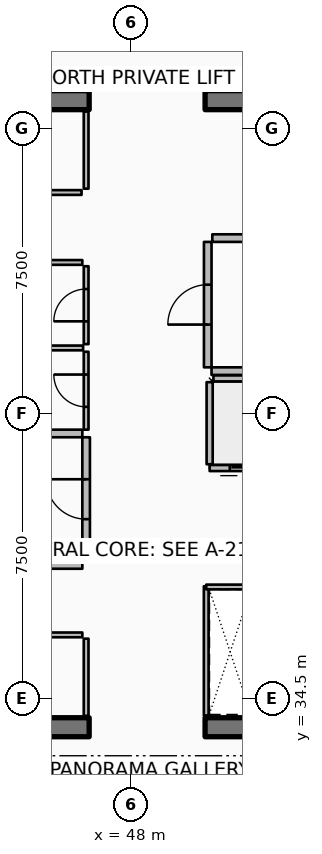
"""IFC4 building model, lengths in metres.
Left out: names, types, materials, properties, quantities, classifications, styles, units other than length and angle.
Written with IfcOpenShell. Run it as: python <this file> out.ifc"""

import sys

from ifc_helpers import new_model, si_unit, direction, frame, frame_2d, origin, place, context, subcontext, project, spatial, rectangle, extrude, element, fill, save


model = new_model("IFC4")
c1 = context("Model", 3, precision=1e-05, world=origin(), true_north=direction((0.0, 1.0)))
c2 = subcontext(c1, "Body", "Model", "MODEL_VIEW")
j1 = project(units=[si_unit("LENGTHUNIT", "METRE"), si_unit("PLANEANGLEUNIT", "RADIAN")], contexts=[c1])
p1 = place(None, origin())
s1 = spatial("IfcSite", under=j1, at=p1, CompositionType="ELEMENT")
p2 = place(p1, origin())
s2 = spatial("IfcBuilding", under=s1, at=p2, CompositionType="ELEMENT")
p3 = place(p2, frame((0.0, 0.0, 306.0)))
s3 = spatial("IfcBuildingStorey", under=s2, at=p3, CompositionType="ELEMENT", Elevation=306.0)
p4 = place(p3, frame((37.3, 33.75, 0.0), z_axis=(0.0, 0.0, 1.0), x_axis=(1.0, 0.0, 0.0)))
e1 = element("IfcWall", 1, at=p4, inside=s3, PredefinedType="SHEAR", context=c2, shape_type="SweptSolid", body=[
    extrude(rectangle(XDim=9.6, YDim=0.5, at=frame_2d((4.8, 0.0))), origin(), (0.0, 0.0, 1.0), 3.85),
])
p5 = place(p3, frame((49.95, 33.75, 0.0), z_axis=(0.0, 0.0, 1.0), x_axis=(1.0, 0.0, 0.0)))
e2 = element("IfcWall", 2, at=p5, inside=s3, PredefinedType="SHEAR", context=c2, shape_type="SweptSolid", body=[
    extrude(rectangle(XDim=9.6, YDim=0.5, at=frame_2d((4.8, 0.0))), origin(), (0.0, 0.0, 1.0), 3.85),
])
p6 = place(p3, frame((37.3, 50.25, 0.0), z_axis=(0.0, 0.0, 1.0), x_axis=(1.0, 0.0, 0.0)))
e3 = element("IfcWall", 3, at=p6, inside=s3, PredefinedType="SHEAR", context=c2, shape_type="SweptSolid", body=[
    extrude(rectangle(XDim=9.6, YDim=0.5, at=frame_2d((4.8, 0.0))), origin(), (0.0, 0.0, 1.0), 3.85),
])
p7 = place(p3, frame((49.95, 50.25, 0.0), z_axis=(0.0, 0.0, 1.0), x_axis=(1.0, 0.0, 0.0)))
e4 = element("IfcWall", 4, at=p7, inside=s3, PredefinedType="SHEAR", context=c2, shape_type="SweptSolid", body=[
    extrude(rectangle(XDim=9.6, YDim=0.5, at=frame_2d((4.8, 0.0))), origin(), (0.0, 0.0, 1.0), 3.85),
])
p8 = place(p3, frame((52.23, 40.57, 0.0), z_axis=(0.0, 0.0, 1.0), x_axis=(-1.0, 0.0, 0.0)))
e5 = element("IfcWall", 5, at=p8, inside=s3, PredefinedType="PARTITIONING", context=c2, shape_type="SweptSolid", body=[
    extrude(rectangle(XDim=2.16, YDim=0.16, at=frame_2d((1.08, 0.0))), origin(), (0.0, 0.0, 1.0), 3.45),
])
p9 = place(p8, frame((0.53, 0.0, 0.0)))
e6 = element("IfcOpeningElement", 6, at=p9, cuts=e5, PredefinedType="OPENING", context=c2, shape_type="SweptSolid", body=[
    extrude(rectangle(XDim=1.1, YDim=2.1, at=frame_2d((0.55, 1.05))), frame((0.0, 0.09, 0.0), z_axis=(0.0, -1.0, 0.0), x_axis=(1.0, 0.0, 0.0)), (0.0, 0.0, 1.0), 0.18),
])
p10 = place(p3, frame((50.07, 40.67, 0.0), z_axis=(0.0, 0.0, 1.0), x_axis=(0.0, 1.0, 0.0)))
e7 = element("IfcWall", 7, at=p10, inside=s3, PredefinedType="PARTITIONING", context=c2, shape_type="SweptSolid", body=[
    extrude(rectangle(XDim=2.16, YDim=0.16, at=frame_2d((1.08, 0.0))), origin(), (0.0, 0.0, 1.0), 3.45),
])
p11 = place(p3, frame((50.17, 42.93, 0.0), z_axis=(0.0, 0.0, 1.0), x_axis=(1.0, 0.0, 0.0)))
e8 = element("IfcWall", 8, at=p11, inside=s3, PredefinedType="PARTITIONING", context=c2, shape_type="SweptSolid", body=[
    extrude(rectangle(XDim=1.96, YDim=0.16, at=frame_2d((0.98, 0.0))), origin(), (0.0, 0.0, 1.0), 3.45),
])
p12 = place(p3, frame((46.82, 34.05, 0.0), z_axis=(0.0, 0.0, 1.0), x_axis=(0.0, 1.0, 0.0)))
e9 = element("IfcWall", 9, at=p12, inside=s3, PredefinedType="PARTITIONING", context=c2, shape_type="SweptSolid", body=[
    extrude(rectangle(XDim=2.03, YDim=0.125, at=frame_2d((1.015, 0.0))), origin(), (0.0, 0.0, 1.0), 2.89),
])
p13 = place(p3, frame((42.6, 36.18, 0.0), z_axis=(0.0, 0.0, 1.0), x_axis=(1.0, 0.0, 0.0)))
e10 = element("IfcWall", 10, at=p13, inside=s3, PredefinedType="PARTITIONING", context=c2, shape_type="SweptSolid", body=[
    extrude(rectangle(XDim=4.12, YDim=0.125, at=frame_2d((2.06, 0.0))), origin(), (0.0, 0.0, 1.0), 2.89),
])
p14 = place(p13, frame((1.635, 0.0, 0.0)))
e11 = element("IfcOpeningElement", 11, at=p14, cuts=e10, PredefinedType="OPENING", context=c2, shape_type="SweptSolid", body=[
    extrude(rectangle(XDim=0.85, YDim=2.06, at=frame_2d((0.425, 1.03))), frame((0.0, 0.073, 0.0), z_axis=(0.0, -1.0, 0.0), x_axis=(1.0, 0.0, 0.0)), (0.0, 0.0, 1.0), 0.145),
])
p15 = place(p3, frame((46.82, 47.92, 0.0), z_axis=(0.0, 0.0, 1.0), x_axis=(0.0, 1.0, 0.0)))
e12 = element("IfcWall", 12, at=p15, inside=s3, PredefinedType="PARTITIONING", context=c2, shape_type="SweptSolid", body=[
    extrude(rectangle(XDim=2.03, YDim=0.125, at=frame_2d((1.015, 0.0))), origin(), (0.0, 0.0, 1.0), 2.89),
])
p16 = place(p3, frame((37.92, 47.82, 0.0), z_axis=(0.0, 0.0, 1.0), x_axis=(1.0, 0.0, 0.0)))
e13 = element("IfcWall", 13, at=p16, inside=s3, PredefinedType="PARTITIONING", context=c2, shape_type="SweptSolid", body=[
    extrude(rectangle(XDim=8.78, YDim=0.125, at=frame_2d((4.39, 0.0))), origin(), (0.0, 0.0, 1.0), 2.89),
])
p17 = place(p16, frame((3.965, 0.0, 0.0)))
e14 = element("IfcOpeningElement", 14, at=p17, cuts=e13, PredefinedType="OPENING", context=c2, shape_type="SweptSolid", body=[
    extrude(rectangle(XDim=0.85, YDim=2.06, at=frame_2d((0.425, 1.03))), frame((0.0, 0.073, 0.0), z_axis=(0.0, -1.0, 0.0), x_axis=(1.0, 0.0, 0.0)), (0.0, 0.0, 1.0), 0.145),
])
p18 = place(p3, frame((41.35, 38.02, 0.0), z_axis=(0.0, 0.0, 1.0), x_axis=(1.0, 0.0, 0.0)))
e15 = element("IfcWall", 15, at=p18, inside=s3, PredefinedType="PARTITIONING", context=c2, shape_type="SweptSolid", body=[
    extrude(rectangle(XDim=5.37, YDim=0.2, at=frame_2d((2.685, 0.0))), origin(), (0.0, 0.0, 1.0), 3.45),
])
p19 = place(p3, frame((43.92, 41.48, 0.0), z_axis=(0.0, 0.0, 1.0), x_axis=(1.0, 0.0, 0.0)))
e16 = element("IfcWall", 16, at=p19, inside=s3, PredefinedType="PARTITIONING", context=c2, shape_type="SweptSolid", body=[
    extrude(rectangle(XDim=2.8, YDim=0.2, at=frame_2d((1.4, 0.0))), origin(), (0.0, 0.0, 1.0), 3.45),
])
p20 = place(p3, frame((46.82, 38.12, 0.0), z_axis=(0.0, 0.0, 1.0), x_axis=(0.0, 1.0, 0.0)))
e17 = element("IfcWall", 17, at=p20, inside=s3, PredefinedType="PARTITIONING", context=c2, shape_type="SweptSolid", body=[
    extrude(rectangle(XDim=3.26, YDim=0.2, at=frame_2d((1.63, 0.0))), origin(), (0.0, 0.0, 1.0), 3.45),
])
p21 = place(p20, frame((1.105, 0.0, 0.0)))
e18 = element("IfcOpeningElement", 18, at=p21, cuts=e17, PredefinedType="OPENING", context=c2, shape_type="SweptSolid", body=[
    extrude(rectangle(XDim=1.05, YDim=2.1, at=frame_2d((0.525, 1.05))), frame((0.0, 0.11, 0.0), z_axis=(0.0, -1.0, 0.0), x_axis=(1.0, 0.0, 0.0)), (0.0, 0.0, 1.0), 0.22),
])
p22 = place(p3, frame((50.12, 43.12, 0.0), z_axis=(0.0, 0.0, 1.0), x_axis=(1.0, 0.0, 0.0)))
e19 = element("IfcWall", 19, at=p22, inside=s3, PredefinedType="PARTITIONING", context=c2, shape_type="SweptSolid", body=[
    extrude(rectangle(XDim=8.88, YDim=0.2, at=frame_2d((4.44, 0.0))), origin(), (0.0, 0.0, 1.0), 3.45),
])
p23 = place(p3, frame((50.14, 46.62, 0.0), z_axis=(0.0, 0.0, 1.0), x_axis=(1.0, 0.0, 0.0)))
e20 = element("IfcWall", 20, at=p23, inside=s3, PredefinedType="PARTITIONING", context=c2, shape_type="SweptSolid", body=[
    extrude(rectangle(XDim=1.02, YDim=0.2, at=frame_2d((0.51, 0.0))), origin(), (0.0, 0.0, 1.0), 3.45),
])
p24 = place(p3, frame((50.02, 43.22, 0.0), z_axis=(0.0, 0.0, 1.0), x_axis=(0.0, 1.0, 0.0)))
e21 = element("IfcWall", 21, at=p24, inside=s3, PredefinedType="PARTITIONING", context=c2, shape_type="SweptSolid", body=[
    extrude(rectangle(XDim=3.3, YDim=0.2, at=frame_2d((1.65, 0.0))), origin(), (0.0, 0.0, 1.0), 3.45),
])
p25 = place(p24, frame((1.125, 0.0, 0.0)))
e22 = element("IfcOpeningElement", 22, at=p25, cuts=e21, PredefinedType="OPENING", context=c2, shape_type="SweptSolid", body=[
    extrude(rectangle(XDim=1.05, YDim=2.1, at=frame_2d((0.525, 1.05))), frame((0.0, 0.11, 0.0), z_axis=(0.0, -1.0, 0.0), x_axis=(1.0, 0.0, 0.0)), (0.0, 0.0, 1.0), 0.22),
])
p26 = place(p3, frame((41.36, 45.98, 0.0), z_axis=(0.0, 0.0, 1.0), x_axis=(1.0, 0.0, 0.0)))
e23 = element("IfcWall", 23, at=p26, inside=s3, PredefinedType="PARTITIONING", context=c2, shape_type="SweptSolid", body=[
    extrude(rectangle(XDim=5.36, YDim=0.125, at=frame_2d((2.68, 0.0))), origin(), (0.0, 0.0, 1.0), 2.89),
])
p27 = place(p3, frame((49.98, 34.06, 0.0), z_axis=(0.0, 0.0, 1.0), x_axis=(0.0, 1.0, 0.0)))
e24 = element("IfcWall", 24, at=p27, inside=s3, PredefinedType="PARTITIONING", context=c2, shape_type="SweptSolid", body=[
    extrude(rectangle(XDim=3.4, YDim=0.125, at=frame_2d((1.7, 0.0))), origin(), (0.0, 0.0, 1.0), 2.89),
])
p28 = place(p3, frame((49.98, 37.44, 0.0), z_axis=(0.0, 0.0, 1.0), x_axis=(1.0, 0.0, 0.0)))
e25 = element("IfcWall", 25, at=p28, inside=s3, PredefinedType="PARTITIONING", context=c2, shape_type="SweptSolid", body=[
    extrude(rectangle(XDim=1.26, YDim=0.125, at=frame_2d((0.63, 0.0))), origin(), (0.0, 0.0, 1.0), 2.89),
])
p29 = place(p3, frame((44.03, 43.73, 0.0), z_axis=(0.0, 0.0, 1.0), x_axis=(1.0, 0.0, 0.0)))
e26 = element("IfcWall", 26, at=p29, inside=s3, PredefinedType="PARTITIONING", context=c2, shape_type="SweptSolid", body=[
    extrude(rectangle(XDim=2.71, YDim=0.125, at=frame_2d((1.355, 0.0))), origin(), (0.0, 0.0, 1.0), 2.89),
])
p30 = place(p3, frame((46.82, 41.58, 0.0), z_axis=(0.0, 0.0, 1.0), x_axis=(0.0, 1.0, 0.0)))
e27 = element("IfcWall", 27, at=p30, inside=s3, PredefinedType="PARTITIONING", context=c2, shape_type="SweptSolid", body=[
    extrude(rectangle(XDim=2.05, YDim=0.125, at=frame_2d((1.025, 0.0))), origin(), (0.0, 0.0, 1.0), 2.89),
])
p31 = place(p30, frame((0.6, 0.0, 0.0)))
e28 = element("IfcOpeningElement", 28, at=p31, cuts=e27, PredefinedType="OPENING", context=c2, shape_type="SweptSolid", body=[
    extrude(rectangle(XDim=0.85, YDim=2.06, at=frame_2d((0.425, 1.03))), frame((0.0, 0.073, 0.0), z_axis=(0.0, -1.0, 0.0), x_axis=(1.0, 0.0, 0.0)), (0.0, 0.0, 1.0), 0.145),
])
p32 = place(p3, frame((46.82, 43.83, 0.0), z_axis=(0.0, 0.0, 1.0), x_axis=(0.0, 1.0, 0.0)))
e29 = element("IfcWall", 29, at=p32, inside=s3, PredefinedType="PARTITIONING", context=c2, shape_type="SweptSolid", body=[
    extrude(rectangle(XDim=2.05, YDim=0.125, at=frame_2d((1.025, 0.0))), origin(), (0.0, 0.0, 1.0), 2.89),
])
p33 = place(p32, frame((0.6, 0.0, 0.0)))
e30 = element("IfcOpeningElement", 30, at=p33, cuts=e29, PredefinedType="OPENING", context=c2, shape_type="SweptSolid", body=[
    extrude(rectangle(XDim=0.85, YDim=2.06, at=frame_2d((0.425, 1.03))), frame((0.0, 0.073, 0.0), z_axis=(0.0, -1.0, 0.0), x_axis=(1.0, 0.0, 0.0)), (0.0, 0.0, 1.0), 0.145),
])
p34 = place(p9, origin())
e31 = element("IfcDoor", 31, at=p34, inside=s3, OperationType="DOUBLE_DOOR_SLIDING", PredefinedType="DOOR", context=c2, shape_type="SweptSolid", body=[
    extrude(rectangle(XDim=1.1, YDim=2.1, at=frame_2d((0.55, 1.05))), frame((0.0, 0.025, 0.0), z_axis=(0.0, -1.0, 0.0), x_axis=(1.0, 0.0, 0.0)), (0.0, 0.0, 1.0), 0.05),
])
fill(e6, e31)
p35 = place(p21, origin())
e32 = element("IfcDoor", 32, at=p35, inside=s3, OperationType="SINGLE_SWING_RIGHT", PredefinedType="DOOR", context=c2, shape_type="SweptSolid", body=[
    extrude(rectangle(XDim=1.05, YDim=2.1, at=frame_2d((0.525, 1.05))), frame((0.0, 0.025, 0.0), z_axis=(0.0, -1.0, 0.0), x_axis=(1.0, 0.0, 0.0)), (0.0, 0.0, 1.0), 0.05),
])
fill(e18, e32)
p36 = place(p25, origin())
e33 = element("IfcDoor", 33, at=p36, inside=s3, OperationType="SINGLE_SWING_LEFT", PredefinedType="DOOR", context=c2, shape_type="SweptSolid", body=[
    extrude(rectangle(XDim=1.05, YDim=2.1, at=frame_2d((0.525, 1.05))), frame((0.0, 0.025, 0.0), z_axis=(0.0, -1.0, 0.0), x_axis=(1.0, 0.0, 0.0)), (0.0, 0.0, 1.0), 0.05),
])
fill(e22, e33)
p37 = place(p31, origin())
e34 = element("IfcDoor", 34, at=p37, inside=s3, OperationType="SINGLE_SWING_RIGHT", PredefinedType="DOOR", context=c2, shape_type="SweptSolid", body=[
    extrude(rectangle(XDim=0.85, YDim=2.06, at=frame_2d((0.425, 1.03))), frame((0.0, 0.025, 0.0), z_axis=(0.0, -1.0, 0.0), x_axis=(1.0, 0.0, 0.0)), (0.0, 0.0, 1.0), 0.05),
])
fill(e28, e34)
p38 = place(p33, origin())
e35 = element("IfcDoor", 35, at=p38, inside=s3, OperationType="SINGLE_SWING_LEFT", PredefinedType="DOOR", context=c2, shape_type="SweptSolid", body=[
    extrude(rectangle(XDim=0.85, YDim=2.06, at=frame_2d((0.425, 1.03))), frame((0.0, 0.025, 0.0), z_axis=(0.0, -1.0, 0.0), x_axis=(1.0, 0.0, 0.0)), (0.0, 0.0, 1.0), 0.05),
])
fill(e30, e35)
save(model, sys.argv[1])
